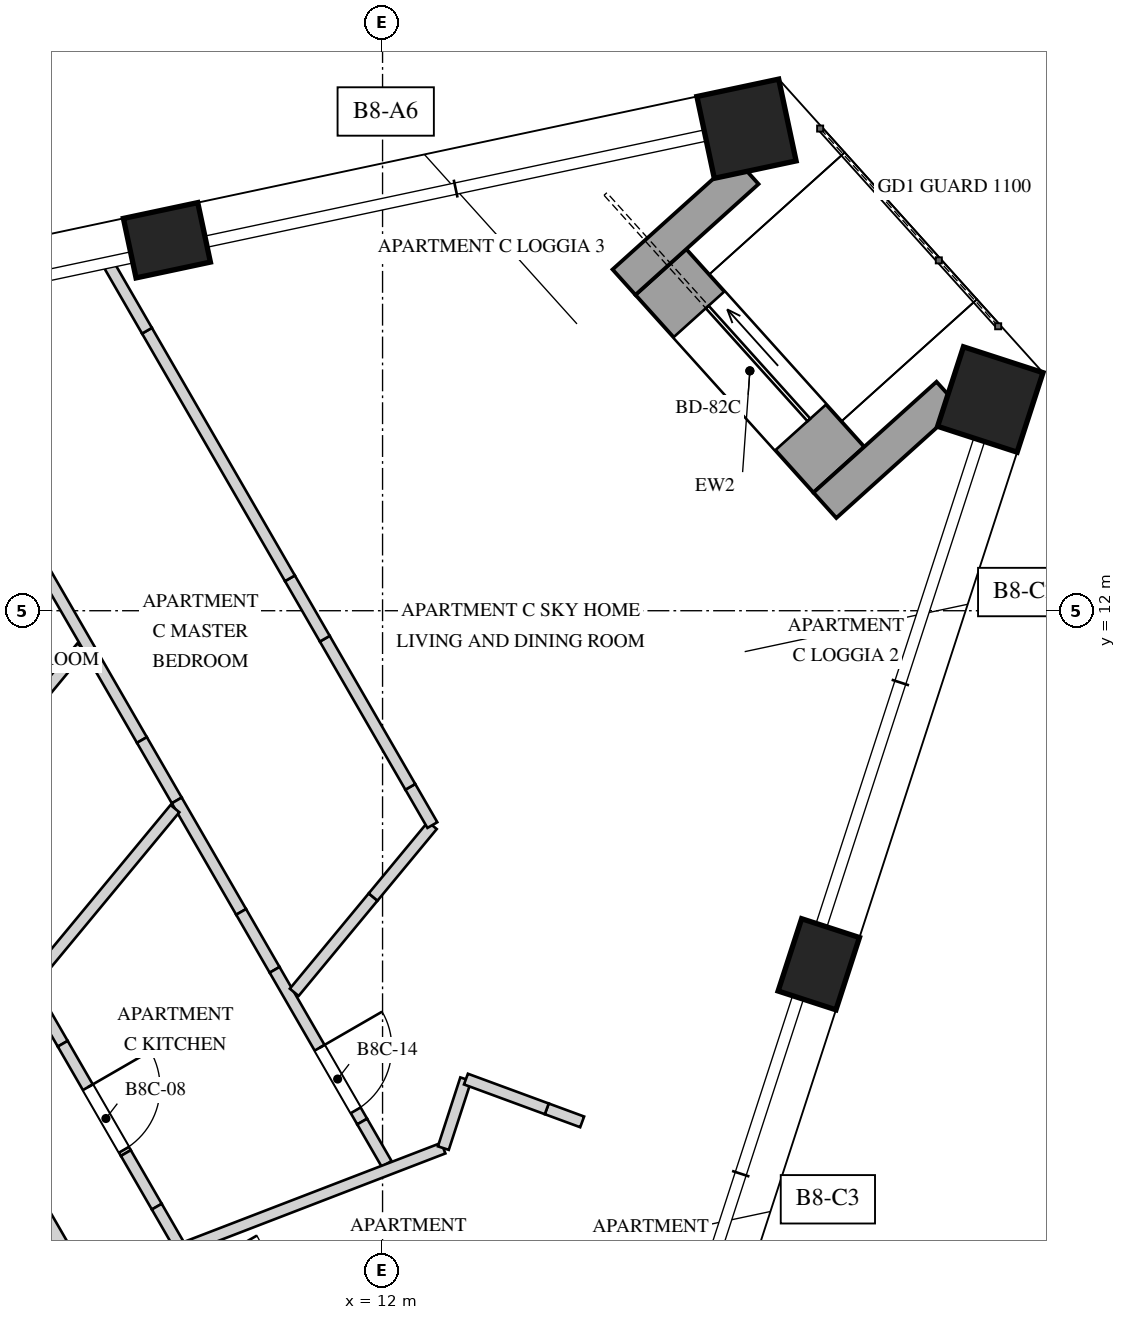
"""IFC4 building model, lengths in metres.
Left out: names, types, materials, properties, quantities, classifications, styles, units other than length and angle.
Written with IfcOpenShell. Run it as: python <this file> out.ifc"""

import sys

from ifc_helpers import new_model, si_unit, direction, frame, frame_2d, origin, origin_2d, place, context, subcontext, project, spatial, polyline, rectangle, outline, extrude, element, fill, save


model = new_model("IFC4")
c1 = context("Model", 3, precision=1e-05, world=origin(), true_north=direction((0.0, 1.0)))
c2 = subcontext(c1, "Body", "Model", "MODEL_VIEW")
j1 = project(units=[si_unit("LENGTHUNIT", "METRE"), si_unit("PLANEANGLEUNIT", "RADIAN")], contexts=[c1])
p1 = place(None, origin())
s1 = spatial("IfcSite", under=j1, at=p1, CompositionType="ELEMENT")
p2 = place(p1, origin())
s2 = spatial("IfcBuilding", under=s1, at=p2, CompositionType="ELEMENT")
p3 = place(p2, frame((0.0, 0.0, 348.4)))
s3 = spatial("IfcBuildingStorey", under=s2, at=p3, CompositionType="ELEMENT", Elevation=348.4)
p4 = place(p3, frame((9.93, -4.25, 0.0), z_axis=(0.0, 0.0, 1.0), x_axis=(-0.499994590896, 0.86602852671, 0.0)))
e1 = element("IfcWall", 1, at=p4, inside=s3, PredefinedType="SHEAR", context=c2, shape_type="SweptSolid", body=[
    extrude(rectangle(XDim=17.292, YDim=0.55, at=frame_2d((8.646, 0.0))), origin(), (0.0, 0.0, 1.0), 4.0),
])
p5 = place(p4, frame((6.921, 0.0, 0.0)))
e2 = element("IfcOpeningElement", 2, at=p5, cuts=e1, PredefinedType="OPENING", context=c2, shape_type="SweptSolid", body=[
    extrude(rectangle(XDim=1.0, YDim=2.4, at=frame_2d((0.5, 1.2))), frame((0.0, 0.285, 0.0), z_axis=(0.0, -1.0, 0.0), x_axis=(1.0, 0.0, 0.0)), (0.0, 0.0, 1.0), 0.57),
])
p6 = place(p3, frame((17.739, 7.349, 0.0), z_axis=(0.0, 0.0, 1.0), x_axis=(0.309016994375, 0.951056516295, 0.0)))
e3 = element("IfcColumn", 3, at=p6, inside=s3, PredefinedType="COLUMN", context=c2, shape_type="SweptSolid", body=[
    extrude(rectangle(XDim=1.0, YDim=0.8, at=origin_2d()), origin(), (0.0, 0.0, 1.0), 4.0),
])
for number, where, z_axis, x_axis in (
    (4, (19.996, 14.779, 0.0), (0.0, 0.0, 1.0), (0.309, 0.951, 0.0)),
    (5, (16.788, 18.341, 0.0), (0.0, 0.0, 1.0), (-0.978, -0.208, 0.0)),
):
    element("IfcColumn", number, at=place(p3, frame(where, z_axis=z_axis, x_axis=x_axis)), inside=s3, PredefinedType="COLUMN", context=c2, shape_type="SweptSolid", body=[
        extrude(rectangle(XDim=1.1, YDim=1.1, at=origin_2d()), origin(), (0.0, 0.0, 1.0), 4.0),
    ])
p7 = place(p3, frame((9.163, 16.874, 0.0), z_axis=(0.0, 0.0, 1.0), x_axis=(-0.978147600734, -0.207911690818, 0.0)))
e6 = element("IfcColumn", 6, at=p7, inside=s3, PredefinedType="COLUMN", context=c2, shape_type="SweptSolid", body=[
    extrude(rectangle(XDim=1.0, YDim=0.8, at=origin_2d()), origin(), (0.0, 0.0, 1.0), 4.0),
])
p8 = place(p3, frame((15.661, 16.456, 0.0), z_axis=(0.0, 0.0, 1.0), x_axis=(0.669134277936, -0.743141519559, 0.0)))
e7 = element("IfcWall", 7, at=p8, inside=s3, PredefinedType="SOLIDWALL", context=c2, shape_type="SweptSolid", body=[
    extrude(rectangle(XDim=3.5, YDim=0.9, at=frame_2d((1.75, 0.0))), origin(), (0.0, 0.0, 1.0), 3.3),
])
p9 = place(p8, frame((0.75, 0.0, 0.0)))
e8 = element("IfcOpeningElement", 8, at=p9, cuts=e7, PredefinedType="OPENING", context=c2, shape_type="SweptSolid", body=[
    extrude(rectangle(XDim=2.0, YDim=2.4, at=frame_2d((1.0, 1.2))), frame((0.0, 0.46, 0.0), z_axis=(0.0, -1.0, 0.0), x_axis=(1.0, 0.0, 0.0)), (0.0, 0.0, 1.0), 0.92),
])
p10 = place(p3, frame((16.796, 17.781, 0.0), z_axis=(0.0, 0.0, 1.0), x_axis=(-0.743165997662, -0.669107091518, 0.0)))
e9 = element("IfcWall", 9, at=p10, inside=s3, PredefinedType="SOLIDWALL", context=c2, shape_type="SweptSolid", body=[
    extrude(rectangle(XDim=2.179, YDim=0.45, at=frame_2d((1.089, 0.0))), origin(), (0.0, 0.0, 1.0), 2.55),
])
p11 = place(p3, frame((19.439, 14.845, 0.0), z_axis=(0.0, 0.0, 1.0), x_axis=(-0.743110286166, -0.669168964159, 0.0)))
e10 = element("IfcWall", 10, at=p11, inside=s3, PredefinedType="SOLIDWALL", context=c2, shape_type="SweptSolid", body=[
    extrude(rectangle(XDim=2.179, YDim=0.45, at=frame_2d((1.09, 0.0))), origin(), (0.0, 0.0, 1.0), 2.55),
])
p12 = place(p3, frame((6.12, 9.199, 0.0), z_axis=(0.0, 0.0, 1.0), x_axis=(0.63755942525, 0.770401180733, 0.0)))
e11 = element("IfcWall", 11, at=p12, inside=s3, PredefinedType="PARTITIONING", context=c2, shape_type="SweptSolid", body=[
    extrude(rectangle(XDim=3.014, YDim=0.15, at=frame_2d((1.507, 0.0))), origin(), (0.0, 0.0, 1.0), 3.65),
])
p13 = place(p12, frame((1.082, 0.0, 0.0)))
e12 = element("IfcOpeningElement", 12, at=p13, cuts=e11, PredefinedType="OPENING", context=c2, shape_type="SweptSolid", body=[
    extrude(rectangle(XDim=0.85, YDim=2.4, at=frame_2d((0.425, 1.2))), frame((0.0, 0.085, 0.0), z_axis=(0.0, -1.0, 0.0), x_axis=(1.0, 0.0, 0.0)), (0.0, 0.0, 1.0), 0.17),
])
p14 = place(p3, frame((7.347, 7.074, 0.0), z_axis=(0.0, 0.0, 1.0), x_axis=(0.499944022619, -0.866057719929, 0.0)))
e13 = element("IfcWall", 13, at=p14, inside=s3, PredefinedType="PARTITIONING", context=c2, shape_type="SweptSolid", body=[
    extrude(rectangle(XDim=0.89, YDim=0.15, at=frame_2d((0.445, 0.0))), origin(), (0.0, 0.0, 1.0), 3.65),
])
p15 = place(p3, frame((7.792, 6.303, 0.0), z_axis=(0.0, 0.0, 1.0), x_axis=(0.500027802648, -0.866009351323, 0.0)))
e14 = element("IfcWall", 14, at=p15, inside=s3, PredefinedType="PARTITIONING", context=c2, shape_type="SweptSolid", body=[
    extrude(outline(polyline([(0.0, 0.0), (1.661, 0.0), (1.661, 3.65), (0.881, 3.65), (0.881, 2.55), (0.0, 2.55), (0.0, 0.0)])), frame((0.0, 0.075, 0.0), z_axis=(0.0, -1.0, 0.0), x_axis=(1.0, 0.0, 0.0)), (0.0, 0.0, 1.0), 0.15),
])
p16 = place(p15, frame((0.661, 0.0, 0.0)))
e15 = element("IfcOpeningElement", 15, at=p16, cuts=e14, PredefinedType="OPENING", context=c2, shape_type="SweptSolid", body=[
    extrude(rectangle(XDim=0.95, YDim=2.4, at=frame_2d((0.475, 1.2))), frame((0.0, 0.085, 0.0), z_axis=(0.0, -1.0, 0.0), x_axis=(1.0, 0.0, 0.0)), (0.0, 0.0, 1.0), 0.17),
])
p17 = place(p3, frame((8.623, 4.865, 0.0), z_axis=(0.0, 0.0, 1.0), x_axis=(0.500042693391, -0.866000753341, 0.0)))
e16 = element("IfcWall", 16, at=p17, inside=s3, PredefinedType="PARTITIONING", context=c2, shape_type="SweptSolid", body=[
    extrude(rectangle(XDim=0.814, YDim=0.15, at=frame_2d((0.407, 0.0))), origin(), (0.0, 0.0, 1.0), 3.65),
])
p18 = place(p3, frame((9.03, 4.16, 0.0), z_axis=(0.0, 0.0, 1.0), x_axis=(0.499767520639, -0.866159584207, 0.0)))
e17 = element("IfcWall", 17, at=p18, inside=s3, PredefinedType="PARTITIONING", context=c2, shape_type="SweptSolid", body=[
    extrude(rectangle(XDim=0.781, YDim=0.15, at=frame_2d((0.391, 0.0))), origin(), (0.0, 0.0, 1.0), 2.75),
])
p19 = place(p3, frame((7.407, 12.771, 0.0), z_axis=(0.0, 0.0, 1.0), x_axis=(0.499966841219, -0.866044547169, 0.0)))
e18 = element("IfcWall", 18, at=p19, inside=s3, PredefinedType="PARTITIONING", context=c2, shape_type="SweptSolid", body=[
    extrude(rectangle(XDim=2.854, YDim=0.15, at=frame_2d((1.427, 0.0))), origin(), (0.0, 0.0, 1.0), 3.65),
])
p20 = place(p3, frame((8.834, 10.299, 0.0), z_axis=(0.0, 0.0, 1.0), x_axis=(0.499945096919, -0.866057099772, 0.0)))
e19 = element("IfcWall", 19, at=p20, inside=s3, PredefinedType="PARTITIONING", context=c2, shape_type="SweptSolid", body=[
    extrude(rectangle(XDim=0.917, YDim=0.15, at=frame_2d((0.459, 0.0))), origin(), (0.0, 0.0, 1.0), 2.55),
])
p21 = place(p3, frame((9.293, 9.504, 0.0), z_axis=(0.0, 0.0, 1.0), x_axis=(0.500046963369, -0.865998287773, 0.0)))
e20 = element("IfcWall", 20, at=p21, inside=s3, PredefinedType="PARTITIONING", context=c2, shape_type="SweptSolid", body=[
    extrude(rectangle(XDim=1.693, YDim=0.15, at=frame_2d((0.847, 0.0))), origin(), (0.0, 0.0, 1.0), 3.65),
])
p22 = place(p3, frame((10.139, 8.038, 0.0), z_axis=(0.0, 0.0, 1.0), x_axis=(0.499866452165, -0.866102493935, 0.0)))
e21 = element("IfcWall", 21, at=p22, inside=s3, PredefinedType="PARTITIONING", context=c2, shape_type="SweptSolid", body=[
    extrude(rectangle(XDim=0.881, YDim=0.15, at=frame_2d((0.44, 0.0))), origin(), (0.0, 0.0, 1.0), 2.55),
])
p23 = place(p3, frame((10.58, 7.275, 0.0), z_axis=(0.0, 0.0, 1.0), x_axis=(0.500012835235, -0.866017993231, 0.0)))
e22 = element("IfcWall", 22, at=p23, inside=s3, PredefinedType="PARTITIONING", context=c2, shape_type="SweptSolid", body=[
    extrude(rectangle(XDim=2.305, YDim=0.15, at=frame_2d((1.152, 0.0))), origin(), (0.0, 0.0, 1.0), 3.65),
])
p24 = place(p23, frame((1.184, 0.0, 0.0)))
e23 = element("IfcOpeningElement", 23, at=p24, cuts=e22, PredefinedType="OPENING", context=c2, shape_type="SweptSolid", body=[
    extrude(rectangle(XDim=0.95, YDim=2.4, at=frame_2d((0.475, 1.2))), frame((0.0, 0.085, 0.0), z_axis=(0.0, -1.0, 0.0), x_axis=(1.0, 0.0, 0.0)), (0.0, 0.0, 1.0), 0.17),
])
p25 = place(p3, frame((11.732, 5.28, 0.0), z_axis=(0.0, 0.0, 1.0), x_axis=(0.500182682664, -0.865919906206, 0.0)))
e24 = element("IfcWall", 24, at=p25, inside=s3, PredefinedType="PARTITIONING", context=c2, shape_type="SweptSolid", body=[
    extrude(rectangle(XDim=0.643, YDim=0.15, at=frame_2d((0.321, 0.0))), origin(), (0.0, 0.0, 1.0), 2.75),
])
p26 = place(p3, frame((9.269, 9.396, 0.0), z_axis=(0.0, 0.0, 1.0), x_axis=(-0.637511345934, -0.770440967113, 0.0)))
e25 = element("IfcWall", 25, at=p26, inside=s3, PredefinedType="PARTITIONING", context=c2, shape_type="SweptSolid", body=[
    extrude(rectangle(XDim=3.014, YDim=0.15, at=frame_2d((1.507, 0.0))), origin(), (0.0, 0.0, 1.0), 3.65),
])
p27 = place(p3, frame((10.838, 6.98, 0.0), z_axis=(0.0, 0.0, 1.0), x_axis=(0.637509370169, 0.770442601981, 0.0)))
e26 = element("IfcWall", 26, at=p27, inside=s3, PredefinedType="PARTITIONING", context=c2, shape_type="SweptSolid", body=[
    extrude(rectangle(XDim=1.627, YDim=0.15, at=frame_2d((0.813, 0.0))), origin(), (0.0, 0.0, 1.0), 3.65),
])
p28 = place(p3, frame((11.875, 8.233, 0.0), z_axis=(0.0, 0.0, 1.0), x_axis=(0.637588147155, 0.770377410499, 0.0)))
e27 = element("IfcWall", 27, at=p28, inside=s3, PredefinedType="PARTITIONING", context=c2, shape_type="SweptSolid", body=[
    extrude(rectangle(XDim=1.223, YDim=0.15, at=frame_2d((0.611, 0.0))), origin(), (0.0, 0.0, 1.0), 2.55),
])
p29 = place(p3, frame((12.656, 9.18, 0.0), z_axis=(0.0, 0.0, 1.0), x_axis=(-0.500025556299, 0.866010648346, 0.0)))
e28 = element("IfcWall", 28, at=p29, inside=s3, PredefinedType="PARTITIONING", context=c2, shape_type="SweptSolid", body=[
    extrude(rectangle(XDim=0.581, YDim=0.15, at=frame_2d((0.291, 0.0))), origin(), (0.0, 0.0, 1.0), 2.55),
])
p30 = place(p3, frame((12.365, 9.683, 0.0), z_axis=(0.0, 0.0, 1.0), x_axis=(-0.499966648284, 0.866044658551, 0.0)))
e29 = element("IfcWall", 29, at=p30, inside=s3, PredefinedType="PARTITIONING", context=c2, shape_type="SweptSolid", body=[
    extrude(rectangle(XDim=2.25, YDim=0.15, at=frame_2d((1.125, 0.0))), origin(), (0.0, 0.0, 1.0), 3.65),
])
p31 = place(p3, frame((11.24, 11.632, 0.0), z_axis=(0.0, 0.0, 1.0), x_axis=(-0.499945096919, 0.866057099772, 0.0)))
e30 = element("IfcWall", 30, at=p31, inside=s3, PredefinedType="PARTITIONING", context=c2, shape_type="SweptSolid", body=[
    extrude(rectangle(XDim=0.917, YDim=0.15, at=frame_2d((0.459, 0.0))), origin(), (0.0, 0.0, 1.0), 2.55),
])
p32 = place(p3, frame((10.781, 12.427, 0.0), z_axis=(0.0, 0.0, 1.0), x_axis=(-0.499999645032, 0.866025608725, 0.0)))
e31 = element("IfcWall", 31, at=p32, inside=s3, PredefinedType="PARTITIONING", context=c2, shape_type="SweptSolid", body=[
    extrude(rectangle(XDim=3.761, YDim=0.15, at=frame_2d((1.881, 0.0))), origin(), (0.0, 0.0, 1.0), 3.65),
])
p33 = place(p3, frame((8.901, 15.684, 0.0), z_axis=(0.0, 0.0, 1.0), x_axis=(-0.500129239174, 0.865950774653, 0.0)))
e32 = element("IfcWall", 32, at=p33, inside=s3, PredefinedType="PARTITIONING", context=c2, shape_type="SweptSolid", body=[
    extrude(rectangle(XDim=0.987, YDim=0.15, at=frame_2d((0.494, 0.0))), origin(), (0.0, 0.0, 1.0), 2.95),
])
p34 = place(p3, frame((12.8, 4.93, 0.0), z_axis=(0.0, 0.0, 1.0), x_axis=(-0.933173371739, -0.359426568685, 0.0)))
e33 = element("IfcWall", 33, at=p34, inside=s3, PredefinedType="PARTITIONING", context=c2, shape_type="SweptSolid", body=[
    extrude(rectangle(XDim=3.619, YDim=0.15, at=frame_2d((1.81, 0.0))), origin(), (0.0, 0.0, 1.0), 2.75),
])
p35 = place(p3, frame((13.094, 5.837, 0.0), z_axis=(0.0, 0.0, 1.0), x_axis=(-0.309074492062, -0.951037832243, 0.0)))
e34 = element("IfcWall", 34, at=p35, inside=s3, PredefinedType="PARTITIONING", context=c2, shape_type="SweptSolid", body=[
    extrude(rectangle(XDim=0.953, YDim=0.15, at=frame_2d((0.477, 0.0))), origin(), (0.0, 0.0, 1.0), 2.75),
])
p36 = place(p3, frame((14.626, 5.275, 0.0), z_axis=(0.0, 0.0, 1.0), x_axis=(-0.938334720131, 0.345728148979, 0.0)))
e35 = element("IfcWall", 35, at=p36, inside=s3, PredefinedType="PARTITIONING", context=c2, shape_type="SweptSolid", body=[
    extrude(rectangle(XDim=0.496, YDim=0.15, at=frame_2d((0.248, 0.0))), origin(), (0.0, 0.0, 1.0), 3.65),
])
p37 = place(p3, frame((14.16, 5.447, 0.0), z_axis=(0.0, 0.0, 1.0), x_axis=(-0.938446088478, 0.345425735897, 0.0)))
e36 = element("IfcWall", 36, at=p37, inside=s3, PredefinedType="PARTITIONING", context=c2, shape_type="SweptSolid", body=[
    extrude(rectangle(XDim=1.133, YDim=0.15, at=frame_2d((0.566, 0.0))), origin(), (0.0, 0.0, 1.0), 2.75),
])
p38 = place(p3, frame((7.146, 4.722, 0.0), z_axis=(0.0, 0.0, 1.0), x_axis=(0.499955681623, -0.866050989499, 0.0)))
e37 = element("IfcWall", 37, at=p38, inside=s3, PredefinedType="SOLIDWALL", context=c2, shape_type="SweptSolid", body=[
    extrude(rectangle(XDim=1.238, YDim=0.2, at=frame_2d((0.619, 0.0))), origin(), (0.0, 0.0, 1.0), 3.65),
])
p39 = place(p9, origin())
e38 = element("IfcDoor", 38, at=p39, inside=s3, OperationType="SLIDING_TO_LEFT", PredefinedType="DOOR", context=c2, shape_type="SweptSolid", body=[
    extrude(rectangle(XDim=2.0, YDim=2.4, at=frame_2d((1.0, 1.2))), frame((0.0, 0.025, 0.0), z_axis=(0.0, -1.0, 0.0), x_axis=(1.0, 0.0, 0.0)), (0.0, 0.0, 1.0), 0.05),
])
fill(e8, e38)
p40 = place(p16, origin())
e39 = element("IfcDoor", 39, at=p40, inside=s3, OperationType="SINGLE_SWING_RIGHT", PredefinedType="DOOR", context=c2, shape_type="SweptSolid", body=[
    extrude(rectangle(XDim=0.95, YDim=2.4, at=frame_2d((0.475, 1.2))), frame((0.0, 0.025, 0.0), z_axis=(0.0, -1.0, 0.0), x_axis=(1.0, 0.0, 0.0)), (0.0, 0.0, 1.0), 0.05),
])
fill(e15, e39)
p41 = place(p24, origin())
e40 = element("IfcDoor", 40, at=p41, inside=s3, OperationType="SINGLE_SWING_RIGHT", PredefinedType="DOOR", context=c2, shape_type="SweptSolid", body=[
    extrude(rectangle(XDim=0.95, YDim=2.4, at=frame_2d((0.475, 1.2))), frame((0.0, 0.025, 0.0), z_axis=(0.0, -1.0, 0.0), x_axis=(1.0, 0.0, 0.0)), (0.0, 0.0, 1.0), 0.05),
])
fill(e23, e40)
save(model, sys.argv[1])
